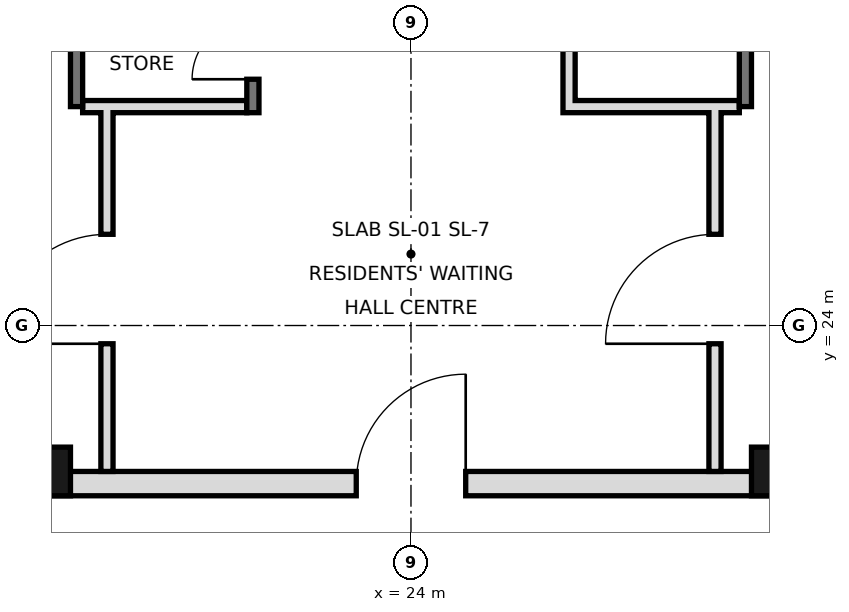
"""IFC4 building model, lengths in metres.
Left out: names, types, materials, properties, quantities, classifications, styles, units other than length and angle.
Written with IfcOpenShell. Run it as: python <this file> out.ifc"""

import sys

from ifc_helpers import new_model, si_unit, direction, frame, frame_2d, origin, origin_2d, place, context, subcontext, project, spatial, rectangle, hollow_rectangle, extrude, element, fill, save


model = new_model("IFC4")
c1 = context("Model", 3, precision=1e-05, world=origin(), true_north=direction((0.0, 1.0)))
c2 = subcontext(c1, "Body", "Model", "MODEL_VIEW")
j1 = project(units=[si_unit("LENGTHUNIT", "METRE"), si_unit("PLANEANGLEUNIT", "RADIAN")], contexts=[c1])
p1 = place(None, origin())
s1 = spatial("IfcSite", under=j1, at=p1, CompositionType="ELEMENT")
p2 = place(p1, origin())
s2 = spatial("IfcBuilding", under=s1, at=p2, CompositionType="ELEMENT")
p3 = place(p2, frame((0.0, 0.0, 312.4)))
s3 = spatial("IfcBuildingStorey", under=s2, at=p3, CompositionType="ELEMENT", Elevation=312.4)
for number, where, z_axis, x_axis in (
    (1, (18.0, 21.6, 0.0), (0.0, 0.0, 1.0), (1.0, 0.0, 0.0)),
    (2, (30.0, 21.6, 0.0), (0.0, 0.0, 1.0), (1.0, 0.0, 0.0)),
):
    element("IfcColumn", number, at=place(p3, frame(where, z_axis=z_axis, x_axis=x_axis)), inside=s3, PredefinedType="COLUMN", context=c2, shape_type="SweptSolid", body=[
        extrude(hollow_rectangle(XDim=0.8, YDim=0.8, WallThickness=0.025, at=origin_2d()), origin(), (0.0, 0.0, 1.0), 3.6),
    ])
for number, where, z_axis, x_axis in (
    (3, (18.5, 27.6, 0.0), (0.0, 0.0, 1.0), (0.0, 1.0, 0.0)),
    (4, (29.5, 27.6, 0.0), (0.0, 0.0, 1.0), (0.0, 1.0, 0.0)),
):
    element("IfcWall", number, at=place(p3, frame(where, z_axis=z_axis, x_axis=x_axis)), inside=s3, PredefinedType="SOLIDWALL", context=c2, shape_type="SweptSolid", body=[
        extrude(rectangle(XDim=17.5, YDim=0.2, at=frame_2d((8.75, 0.0))), origin(), (0.0, 0.0, 1.0), 3.42),
    ])
p4 = place(p3, frame((5.6, 21.4, 0.0), z_axis=(0.0, 0.0, 1.0), x_axis=(1.0, 0.0, 0.0)))
e5 = element("IfcWall", 5, at=p4, inside=s3, PredefinedType="SOLIDWALL", context=c2, shape_type="SweptSolid", body=[
    extrude(rectangle(XDim=36.8, YDim=0.4, at=frame_2d((18.4, 0.0))), origin(), (0.0, 0.0, 1.0), 3.42),
])
p5 = place(p4, frame((8.5, 0.0, 0.0)))
e6 = element("IfcOpeningElement", 6, at=p5, cuts=e5, PredefinedType="OPENING", context=c2, shape_type="SweptSolid", body=[
    extrude(rectangle(XDim=1.8, YDim=2.1, at=frame_2d((0.9, 1.05))), frame((0.0, 0.21, 0.0), z_axis=(0.0, -1.0, 0.0), x_axis=(1.0, 0.0, 0.0)), (0.0, 0.0, 1.0), 0.42),
])
p6 = place(p4, frame((17.5, 0.0, 0.0)))
e7 = element("IfcOpeningElement", 7, at=p6, cuts=e5, PredefinedType="OPENING", context=c2, shape_type="SweptSolid", body=[
    extrude(rectangle(XDim=1.8, YDim=2.1, at=frame_2d((0.9, 1.05))), frame((0.0, 0.21, 0.0), z_axis=(0.0, -1.0, 0.0), x_axis=(1.0, 0.0, 0.0)), (0.0, 0.0, 1.0), 0.42),
])
p7 = place(p4, frame((26.5, 0.0, 0.0)))
e8 = element("IfcOpeningElement", 8, at=p7, cuts=e5, PredefinedType="OPENING", context=c2, shape_type="SweptSolid", body=[
    extrude(rectangle(XDim=1.8, YDim=2.1, at=frame_2d((0.9, 1.05))), frame((0.0, 0.21, 0.0), z_axis=(0.0, -1.0, 0.0), x_axis=(1.0, 0.0, 0.0)), (0.0, 0.0, 1.0), 0.42),
])
p8 = place(p4, frame((4.5, 0.0, 0.0)))
e9 = element("IfcOpeningElement", 9, at=p8, cuts=e5, PredefinedType="OPENING", context=c2, shape_type="SweptSolid", body=[
    extrude(rectangle(XDim=1.2, YDim=2.1, at=frame_2d((0.6, 1.05))), frame((0.0, 0.21, 0.0), z_axis=(0.0, -1.0, 0.0), x_axis=(1.0, 0.0, 0.0)), (0.0, 0.0, 1.0), 0.42),
])
p9 = place(p4, frame((31.1, 0.0, 0.0)))
e10 = element("IfcOpeningElement", 10, at=p9, cuts=e5, PredefinedType="OPENING", context=c2, shape_type="SweptSolid", body=[
    extrude(rectangle(XDim=1.2, YDim=2.1, at=frame_2d((0.6, 1.05))), frame((0.0, 0.21, 0.0), z_axis=(0.0, -1.0, 0.0), x_axis=(1.0, 0.0, 0.0)), (0.0, 0.0, 1.0), 0.42),
])
p10 = place(p3, frame((19.0, 21.6, 0.0), z_axis=(0.0, 0.0, 1.0), x_axis=(0.0, 1.0, 0.0)))
e11 = element("IfcWall", 11, at=p10, inside=s3, PredefinedType="PARTITIONING", context=c2, shape_type="SweptSolid", body=[
    extrude(rectangle(XDim=6.0, YDim=0.2, at=frame_2d((3.0, 0.0))), origin(), (0.0, 0.0, 1.0), 3.42),
])
p11 = place(p10, frame((2.1, 0.0, 0.0)))
e12 = element("IfcOpeningElement", 12, at=p11, cuts=e11, PredefinedType="OPENING", context=c2, shape_type="SweptSolid", body=[
    extrude(rectangle(XDim=1.8, YDim=2.1, at=frame_2d((0.9, 1.05))), frame((0.0, 0.11, 0.0), z_axis=(0.0, -1.0, 0.0), x_axis=(1.0, 0.0, 0.0)), (0.0, 0.0, 1.0), 0.22),
])
p12 = place(p3, frame((29.0, 21.6, 0.0), z_axis=(0.0, 0.0, 1.0), x_axis=(0.0, 1.0, 0.0)))
e13 = element("IfcWall", 13, at=p12, inside=s3, PredefinedType="PARTITIONING", context=c2, shape_type="SweptSolid", body=[
    extrude(rectangle(XDim=6.0, YDim=0.2, at=frame_2d((3.0, 0.0))), origin(), (0.0, 0.0, 1.0), 3.42),
])
p13 = place(p12, frame((2.1, 0.0, 0.0)))
e14 = element("IfcOpeningElement", 14, at=p13, cuts=e13, PredefinedType="OPENING", context=c2, shape_type="SweptSolid", body=[
    extrude(rectangle(XDim=1.8, YDim=2.1, at=frame_2d((0.9, 1.05))), frame((0.0, 0.11, 0.0), z_axis=(0.0, -1.0, 0.0), x_axis=(1.0, 0.0, 0.0)), (0.0, 0.0, 1.0), 0.22),
])
p14 = place(p3, frame((21.4, 27.5, 0.0), z_axis=(0.0, 0.0, 1.0), x_axis=(0.0, 1.0, 0.0)))
e15 = element("IfcWall", 15, at=p14, inside=s3, PredefinedType="SOLIDWALL", context=c2, shape_type="SweptSolid", body=[
    extrude(rectangle(XDim=17.5, YDim=0.2, at=frame_2d((8.75, 0.0))), origin(), (0.0, 0.0, 1.0), 3.42),
])
p15 = place(p14, frame((0.55, 0.0, 0.0)))
e16 = element("IfcOpeningElement", 16, at=p15, cuts=e15, PredefinedType="OPENING", context=c2, shape_type="SweptSolid", body=[
    extrude(rectangle(XDim=1.0, YDim=2.1, at=frame_2d((0.5, 1.05))), frame((0.0, 0.11, 0.0), z_axis=(0.0, -1.0, 0.0), x_axis=(1.0, 0.0, 0.0)), (0.0, 0.0, 1.0), 0.22),
])
p16 = place(p14, frame((3.65, 0.0, 0.0)))
e17 = element("IfcOpeningElement", 17, at=p16, cuts=e15, PredefinedType="OPENING", context=c2, shape_type="SweptSolid", body=[
    extrude(rectangle(XDim=1.0, YDim=2.1, at=frame_2d((0.5, 1.05))), frame((0.0, 0.11, 0.0), z_axis=(0.0, -1.0, 0.0), x_axis=(1.0, 0.0, 0.0)), (0.0, 0.0, 1.0), 0.22),
])
p17 = place(p14, frame((16.2, 0.0, 0.0)))
e18 = element("IfcOpeningElement", 18, at=p17, cuts=e15, PredefinedType="OPENING", context=c2, shape_type="SweptSolid", body=[
    extrude(rectangle(XDim=1.0, YDim=2.1, at=frame_2d((0.5, 1.05))), frame((0.0, 0.11, 0.0), z_axis=(0.0, -1.0, 0.0), x_axis=(1.0, 0.0, 0.0)), (0.0, 0.0, 1.0), 0.22),
])
p18 = place(p14, frame((7.4, 0.0, 0.0)))
e19 = element("IfcOpeningElement", 19, at=p18, cuts=e15, PredefinedType="OPENING", context=c2, shape_type="SweptSolid", body=[
    extrude(rectangle(XDim=0.9, YDim=2.1, at=frame_2d((0.45, 1.05))), frame((0.0, 0.11, 0.0), z_axis=(0.0, -1.0, 0.0), x_axis=(1.0, 0.0, 0.0)), (0.0, 0.0, 1.0), 0.22),
])
p19 = place(p3, frame((26.6, 27.5, 0.0), z_axis=(0.0, 0.0, 1.0), x_axis=(0.0, 1.0, 0.0)))
e20 = element("IfcWall", 20, at=p19, inside=s3, PredefinedType="SOLIDWALL", context=c2, shape_type="SweptSolid", body=[
    extrude(rectangle(XDim=17.5, YDim=0.2, at=frame_2d((8.75, 0.0))), origin(), (0.0, 0.0, 1.0), 3.42),
])
p20 = place(p19, frame((4.3, 0.0, 0.0)))
e21 = element("IfcOpeningElement", 21, at=p20, cuts=e20, PredefinedType="OPENING", context=c2, shape_type="SweptSolid", body=[
    extrude(rectangle(XDim=0.9, YDim=2.1, at=frame_2d((0.45, 1.05))), frame((0.0, 0.11, 0.0), z_axis=(0.0, -1.0, 0.0), x_axis=(1.0, 0.0, 0.0)), (0.0, 0.0, 1.0), 0.22),
])
p21 = place(p19, frame((10.35, 0.0, 0.0)))
e22 = element("IfcOpeningElement", 22, at=p21, cuts=e20, PredefinedType="OPENING", context=c2, shape_type="SweptSolid", body=[
    extrude(rectangle(XDim=1.0, YDim=2.1, at=frame_2d((0.5, 1.05))), frame((0.0, 0.11, 0.0), z_axis=(0.0, -1.0, 0.0), x_axis=(1.0, 0.0, 0.0)), (0.0, 0.0, 1.0), 0.22),
])
p22 = place(p19, frame((15.475, 0.0, 0.0)))
e23 = element("IfcOpeningElement", 23, at=p22, cuts=e20, PredefinedType="OPENING", context=c2, shape_type="SweptSolid", body=[
    extrude(rectangle(XDim=1.0, YDim=2.1, at=frame_2d((0.5, 1.05))), frame((0.0, 0.11, 0.0), z_axis=(0.0, -1.0, 0.0), x_axis=(1.0, 0.0, 0.0)), (0.0, 0.0, 1.0), 0.22),
])
p23 = place(p3, frame((18.6, 27.6, 0.0), z_axis=(0.0, 0.0, 1.0), x_axis=(1.0, 0.0, 0.0)))
e24 = element("IfcWall", 24, at=p23, inside=s3, PredefinedType="PARTITIONING", context=c2, shape_type="SweptSolid", body=[
    extrude(rectangle(XDim=2.7, YDim=0.2, at=frame_2d((1.35, 0.0))), origin(), (0.0, 0.0, 1.0), 3.42),
])
p24 = place(p3, frame((26.7, 27.6, 0.0), z_axis=(0.0, 0.0, 1.0), x_axis=(1.0, 0.0, 0.0)))
e25 = element("IfcWall", 25, at=p24, inside=s3, PredefinedType="SOLIDWALL", context=c2, shape_type="SweptSolid", body=[
    extrude(rectangle(XDim=2.7, YDim=0.2, at=frame_2d((1.35, 0.0))), origin(), (0.0, 0.0, 1.0), 3.42),
])
p25 = place(p11, origin())
e26 = element("IfcDoor", 26, at=p25, inside=s3, OperationType="SINGLE_SWING_LEFT", PredefinedType="DOOR", context=c2, shape_type="SweptSolid", body=[
    extrude(rectangle(XDim=1.8, YDim=2.1, at=frame_2d((0.9, 1.05))), frame((0.0, 0.025, 0.0), z_axis=(0.0, -1.0, 0.0), x_axis=(1.0, 0.0, 0.0)), (0.0, 0.0, 1.0), 0.05),
])
fill(e12, e26)
p26 = place(p6, frame((1.8, 0.0, 0.0), z_axis=(0.0, 0.0, 1.0), x_axis=(-1.0, 0.0, 0.0)))
e27 = element("IfcDoor", 27, at=p26, inside=s3, OperationType="SINGLE_SWING_LEFT", PredefinedType="DOOR", context=c2, shape_type="SweptSolid", body=[
    extrude(rectangle(XDim=1.8, YDim=2.1, at=frame_2d((0.9, 1.05))), frame((0.0, 0.025, 0.0), z_axis=(0.0, -1.0, 0.0), x_axis=(1.0, 0.0, 0.0)), (0.0, 0.0, 1.0), 0.05),
])
fill(e7, e27)
p27 = place(p13, origin())
e28 = element("IfcDoor", 28, at=p27, inside=s3, OperationType="SINGLE_SWING_LEFT", PredefinedType="DOOR", context=c2, shape_type="SweptSolid", body=[
    extrude(rectangle(XDim=1.8, YDim=2.1, at=frame_2d((0.9, 1.05))), frame((0.0, 0.025, 0.0), z_axis=(0.0, -1.0, 0.0), x_axis=(1.0, 0.0, 0.0)), (0.0, 0.0, 1.0), 0.05),
])
fill(e14, e28)
p28 = place(p15, origin())
e29 = element("IfcDoor", 29, at=p28, inside=s3, OperationType="SINGLE_SWING_LEFT", PredefinedType="DOOR", context=c2, shape_type="SweptSolid", body=[
    extrude(rectangle(XDim=1.0, YDim=2.1, at=frame_2d((0.5, 1.05))), frame((0.0, 0.025, 0.0), z_axis=(0.0, -1.0, 0.0), x_axis=(1.0, 0.0, 0.0)), (0.0, 0.0, 1.0), 0.05),
])
fill(e16, e29)
save(model, sys.argv[1])
